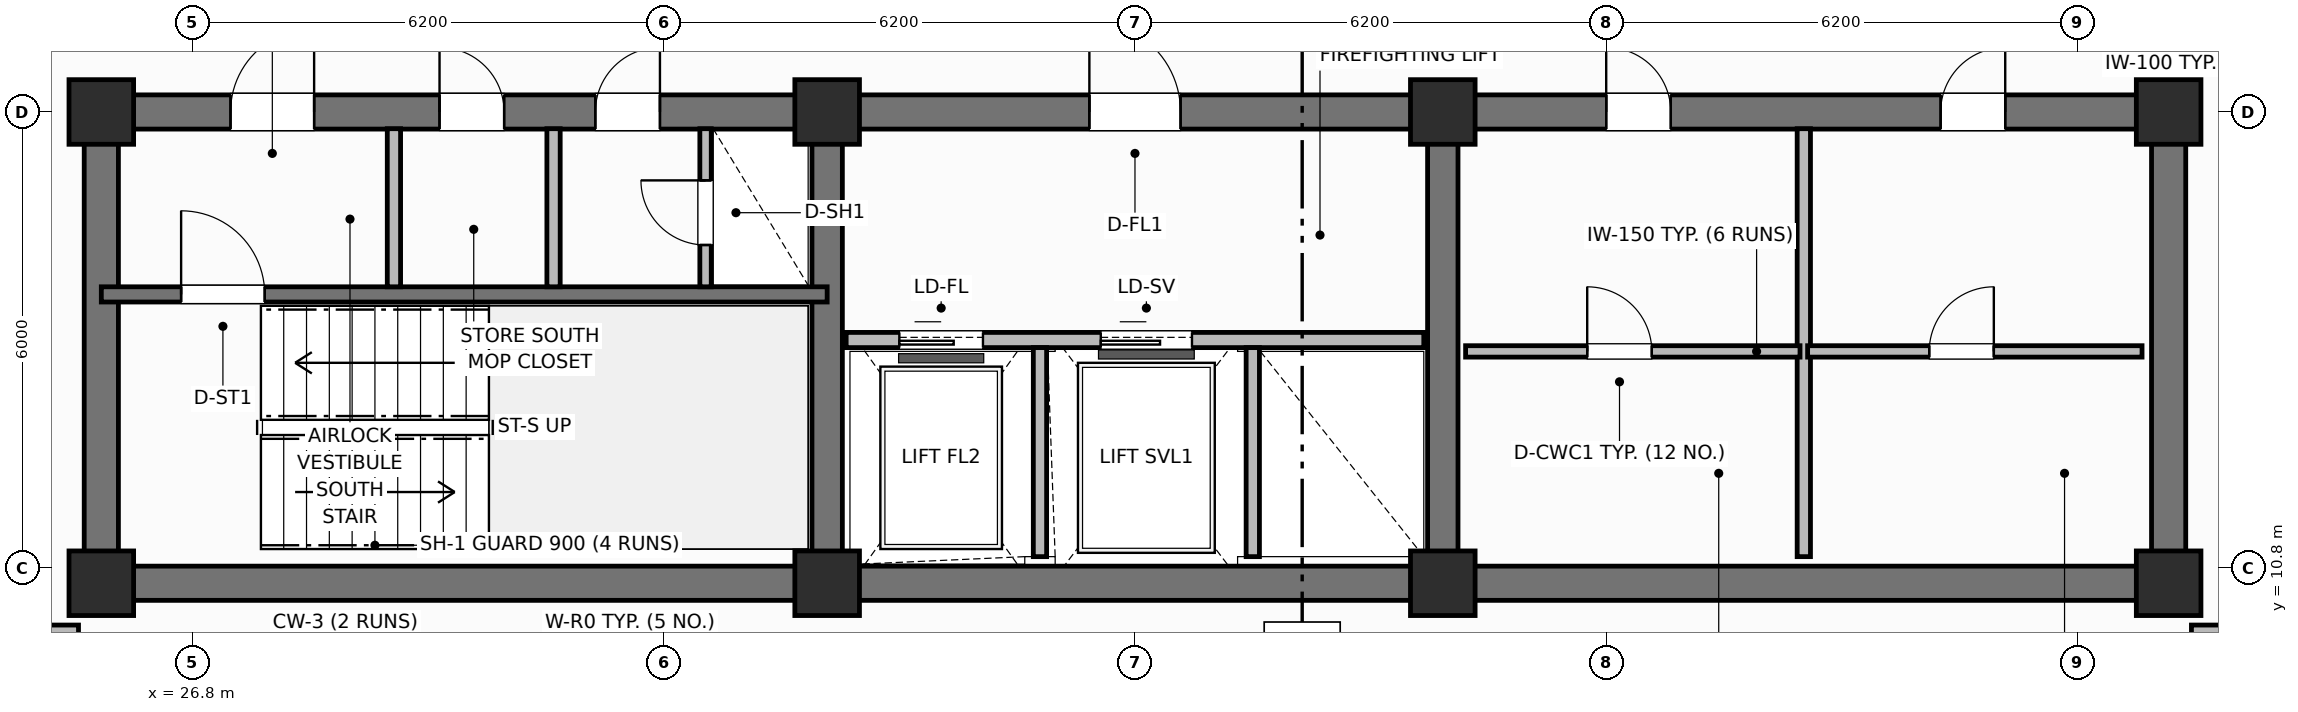
"""IFC4 building model, lengths in metres.
Left out: names, types, materials, properties, quantities, classifications, styles, units other than length and angle.
Written with IfcOpenShell. Run it as: python <this file> out.ifc"""

import sys

from ifc_helpers import new_model, si_unit, direction, frame, frame_2d, origin, origin_2d, place, context, subcontext, project, spatial, rectangle, extrude, element, fill, save


model = new_model("IFC4")
c1 = context("Model", 3, precision=1e-05, world=origin(), true_north=direction((0.0, 1.0)))
c2 = subcontext(c1, "Body", "Model", "MODEL_VIEW")
j1 = project(units=[si_unit("LENGTHUNIT", "METRE"), si_unit("PLANEANGLEUNIT", "RADIAN")], contexts=[c1])
p1 = place(None, origin())
s1 = spatial("IfcSite", under=j1, at=p1, CompositionType="ELEMENT")
p2 = place(p1, origin())
s2 = spatial("IfcBuilding", under=s1, at=p2, CompositionType="ELEMENT")
p3 = place(p2, frame((0.0, 0.0, 236.9)))
s3 = spatial("IfcBuildingStorey", under=s2, at=p3, CompositionType="ELEMENT", Elevation=236.9)
p4 = place(p3, frame((52.8, 10.6, 0.0), z_axis=(0.0, 0.0, 1.0), x_axis=(-1.0, 0.0, 0.0)))
e1 = element("IfcWall", 1, at=p4, inside=s3, PredefinedType="SHEAR", context=c2, shape_type="SweptSolid", body=[
    extrude(rectangle(XDim=27.2, YDim=0.45, at=frame_2d((13.6, 0.0))), origin(), (0.0, 0.0, 1.0), 3.7),
])
for number, where, z_axis, x_axis in (
    (2, (25.6, 10.825, 0.0), (0.0, 0.0, 1.0), (0.0, 1.0, 0.0)),
    (3, (52.8, 10.825, 0.0), (0.0, 0.0, 1.0), (0.0, 1.0, 0.0)),
):
    element("IfcWall", number, at=place(p3, frame(where, z_axis=z_axis, x_axis=x_axis)), inside=s3, PredefinedType="SHEAR", context=c2, shape_type="SweptSolid", body=[
        extrude(rectangle(XDim=5.75, YDim=0.45, at=frame_2d((2.875, 0.0))), origin(), (0.0, 0.0, 1.0), 3.7),
    ])
p5 = place(p3, frame((25.6, 16.8, 0.0), z_axis=(0.0, 0.0, 1.0), x_axis=(1.0, 0.0, 0.0)))
e4 = element("IfcWall", 4, at=p5, inside=s3, PredefinedType="SHEAR", context=c2, shape_type="SweptSolid", body=[
    extrude(rectangle(XDim=27.2, YDim=0.45, at=frame_2d((13.6, 0.0))), origin(), (0.0, 0.0, 1.0), 3.7),
])
p6 = place(p5, frame((1.7, 0.0, 0.0)))
e5 = element("IfcOpeningElement", 5, at=p6, cuts=e4, PredefinedType="OPENING", context=c2, shape_type="SweptSolid", body=[
    extrude(rectangle(XDim=1.1, YDim=2.15, at=frame_2d((0.55, 1.075))), frame((0.0, 0.235, 0.0), z_axis=(0.0, -1.0, 0.0), x_axis=(1.0, 0.0, 0.0)), (0.0, 0.0, 1.0), 0.47),
])
p7 = place(p5, frame((4.45, 0.0, 0.0)))
e6 = element("IfcOpeningElement", 6, at=p7, cuts=e4, PredefinedType="OPENING", context=c2, shape_type="SweptSolid", body=[
    extrude(rectangle(XDim=0.85, YDim=2.1, at=frame_2d((0.425, 1.05))), frame((0.0, 0.235, 0.0), z_axis=(0.0, -1.0, 0.0), x_axis=(1.0, 0.0, 0.0)), (0.0, 0.0, 1.0), 0.47),
])
p8 = place(p5, frame((6.5, 0.0, 0.0)))
e7 = element("IfcOpeningElement", 7, at=p8, cuts=e4, PredefinedType="OPENING", context=c2, shape_type="SweptSolid", body=[
    extrude(rectangle(XDim=0.85, YDim=2.1, at=frame_2d((0.425, 1.05))), frame((0.0, 0.235, 0.0), z_axis=(0.0, -1.0, 0.0), x_axis=(1.0, 0.0, 0.0)), (0.0, 0.0, 1.0), 0.47),
])
p9 = place(p5, frame((13.0, 0.0, 0.0)))
e8 = element("IfcOpeningElement", 8, at=p9, cuts=e4, PredefinedType="OPENING", context=c2, shape_type="SweptSolid", body=[
    extrude(rectangle(XDim=1.2, YDim=2.15, at=frame_2d((0.6, 1.075))), frame((0.0, 0.235, 0.0), z_axis=(0.0, -1.0, 0.0), x_axis=(1.0, 0.0, 0.0)), (0.0, 0.0, 1.0), 0.47),
])
p10 = place(p5, frame((19.8, 0.0, 0.0)))
e9 = element("IfcOpeningElement", 9, at=p10, cuts=e4, PredefinedType="OPENING", context=c2, shape_type="SweptSolid", body=[
    extrude(rectangle(XDim=0.85, YDim=2.1, at=frame_2d((0.425, 1.05))), frame((0.0, 0.235, 0.0), z_axis=(0.0, -1.0, 0.0), x_axis=(1.0, 0.0, 0.0)), (0.0, 0.0, 1.0), 0.47),
])
p11 = place(p5, frame((24.2, 0.0, 0.0)))
e10 = element("IfcOpeningElement", 10, at=p11, cuts=e4, PredefinedType="OPENING", context=c2, shape_type="SweptSolid", body=[
    extrude(rectangle(XDim=0.85, YDim=2.1, at=frame_2d((0.425, 1.05))), frame((0.0, 0.235, 0.0), z_axis=(0.0, -1.0, 0.0), x_axis=(1.0, 0.0, 0.0)), (0.0, 0.0, 1.0), 0.47),
])
for number, where, z_axis, x_axis in (
    (11, (35.15, 10.825, 0.0), (0.0, 0.0, 1.0), (0.0, 1.0, 0.0)),
    (12, (43.25, 10.825, 0.0), (0.0, 0.0, 1.0), (0.0, 1.0, 0.0)),
):
    element("IfcWall", number, at=place(p3, frame(where, z_axis=z_axis, x_axis=x_axis)), inside=s3, PredefinedType="SHEAR", context=c2, shape_type="SweptSolid", body=[
        extrude(rectangle(XDim=5.75, YDim=0.4, at=frame_2d((2.875, 0.0))), origin(), (0.0, 0.0, 1.0), 3.7),
    ])
for number, where, z_axis, x_axis in (
    (13, (25.6, 10.6, 0.0), (0.0, 0.0, 1.0), (1.0, 0.0, 0.0)),
    (14, (25.6, 16.8, 0.0), (0.0, 0.0, 1.0), (1.0, 0.0, 0.0)),
    (15, (35.15, 10.6, 0.0), (0.0, 0.0, 1.0), (1.0, 0.0, 0.0)),
    (16, (35.15, 16.8, 0.0), (0.0, 0.0, 1.0), (1.0, 0.0, 0.0)),
    (17, (43.25, 10.6, 0.0), (0.0, 0.0, 1.0), (1.0, 0.0, 0.0)),
    (18, (43.25, 16.8, 0.0), (0.0, 0.0, 1.0), (1.0, 0.0, 0.0)),
    (19, (52.8, 10.6, 0.0), (0.0, 0.0, 1.0), (1.0, 0.0, 0.0)),
    (20, (52.8, 16.8, 0.0), (0.0, 0.0, 1.0), (1.0, 0.0, 0.0)),
):
    element("IfcColumn", number, at=place(p3, frame(where, z_axis=z_axis, x_axis=x_axis)), inside=s3, PredefinedType="COLUMN", context=c2, shape_type="SweptSolid", body=[
        extrude(rectangle(XDim=0.85, YDim=0.85, at=origin_2d()), origin(), (0.0, 0.0, 1.0), 3.7),
    ])
p12 = place(p3, frame((25.6, 14.4, 0.0), z_axis=(0.0, 0.0, 1.0), x_axis=(1.0, 0.0, 0.0)))
e21 = element("IfcWall", 21, at=p12, inside=s3, PredefinedType="SHEAR", context=c2, shape_type="SweptSolid", body=[
    extrude(rectangle(XDim=9.55, YDim=0.2, at=frame_2d((4.775, 0.0))), origin(), (0.0, 0.0, 1.0), 3.7),
])
p13 = place(p12, frame((1.05, 0.0, 0.0)))
e22 = element("IfcOpeningElement", 22, at=p13, cuts=e21, PredefinedType="OPENING", context=c2, shape_type="SweptSolid", body=[
    extrude(rectangle(XDim=1.1, YDim=2.15, at=frame_2d((0.55, 1.075))), frame((0.0, 0.11, 0.0), z_axis=(0.0, -1.0, 0.0), x_axis=(1.0, 0.0, 0.0)), (0.0, 0.0, 1.0), 0.22),
])
for number, where, z_axis, x_axis in (
    (23, (29.45, 14.5, 0.0), (0.0, 0.0, 1.0), (0.0, 1.0, 0.0)),
    (24, (31.55, 14.5, 0.0), (0.0, 0.0, 1.0), (0.0, 1.0, 0.0)),
):
    element("IfcWall", number, at=place(p3, frame(where, z_axis=z_axis, x_axis=x_axis)), inside=s3, PredefinedType="PARTITIONING", context=c2, shape_type="SweptSolid", body=[
        extrude(rectangle(XDim=2.08, YDim=0.175, at=frame_2d((1.04, 0.0))), origin(), (0.0, 0.0, 1.0), 2.56),
    ])
p14 = place(p3, frame((33.55, 14.5, 0.0), z_axis=(0.0, 0.0, 1.0), x_axis=(0.0, 1.0, 0.0)))
e25 = element("IfcWall", 25, at=p14, inside=s3, PredefinedType="PARTITIONING", context=c2, shape_type="SweptSolid", body=[
    extrude(rectangle(XDim=2.08, YDim=0.15, at=frame_2d((1.04, 0.0))), origin(), (0.0, 0.0, 1.0), 2.56),
])
p15 = place(p14, frame((0.55, 0.0, 0.0)))
e26 = element("IfcOpeningElement", 26, at=p15, cuts=e25, PredefinedType="OPENING", context=c2, shape_type="SweptSolid", body=[
    extrude(rectangle(XDim=0.85, YDim=2.05, at=frame_2d((0.425, 1.025))), frame((0.0, 0.085, 0.0), z_axis=(0.0, -1.0, 0.0), x_axis=(1.0, 0.0, 0.0)), (0.0, 0.0, 1.0), 0.17),
])
p16 = place(p3, frame((35.4, 13.8, 0.0), z_axis=(0.0, 0.0, 1.0), x_axis=(1.0, 0.0, 0.0)))
e27 = element("IfcWall", 27, at=p16, inside=s3, PredefinedType="PARTITIONING", context=c2, shape_type="SweptSolid", body=[
    extrude(rectangle(XDim=7.6, YDim=0.2, at=frame_2d((3.8, 0.0))), origin(), (0.0, 0.0, 1.0), 2.33),
])
p17 = place(p16, frame((0.7, 0.0, 0.0)))
e28 = element("IfcOpeningElement", 28, at=p17, cuts=e27, PredefinedType="OPENING", context=c2, shape_type="SweptSolid", body=[
    extrude(rectangle(XDim=1.1, YDim=2.15, at=frame_2d((0.55, 1.075))), frame((0.0, 0.11, 0.0), z_axis=(0.0, -1.0, 0.0), x_axis=(1.0, 0.0, 0.0)), (0.0, 0.0, 1.0), 0.22),
])
p18 = place(p16, frame((3.35, 0.0, 0.0)))
e29 = element("IfcOpeningElement", 29, at=p18, cuts=e27, PredefinedType="OPENING", context=c2, shape_type="SweptSolid", body=[
    extrude(rectangle(XDim=1.2, YDim=2.15, at=frame_2d((0.6, 1.075))), frame((0.0, 0.11, 0.0), z_axis=(0.0, -1.0, 0.0), x_axis=(1.0, 0.0, 0.0)), (0.0, 0.0, 1.0), 0.22),
])
for number, where, z_axis, x_axis in (
    (30, (37.95, 10.95, 0.0), (0.0, 0.0, 1.0), (0.0, 1.0, 0.0)),
    (31, (40.75, 10.95, 0.0), (0.0, 0.0, 1.0), (0.0, 1.0, 0.0)),
):
    element("IfcWall", number, at=place(p3, frame(where, z_axis=z_axis, x_axis=x_axis)), inside=s3, PredefinedType="PARTITIONING", context=c2, shape_type="SweptSolid", body=[
        extrude(rectangle(XDim=2.75, YDim=0.175, at=frame_2d((1.375, 0.0))), origin(), (0.0, 0.0, 1.0), 2.56),
    ])
p19 = place(p3, frame((48.0, 10.95, 0.0), z_axis=(0.0, 0.0, 1.0), x_axis=(0.0, 1.0, 0.0)))
e32 = element("IfcWall", 32, at=p19, inside=s3, PredefinedType="PARTITIONING", context=c2, shape_type="SweptSolid", body=[
    extrude(rectangle(XDim=5.63, YDim=0.175, at=frame_2d((2.815, 0.0))), origin(), (0.0, 0.0, 1.0), 2.56),
])
p20 = place(p3, frame((43.55, 13.65, 0.0), z_axis=(0.0, 0.0, 1.0), x_axis=(1.0, 0.0, 0.0)))
e33 = element("IfcWall", 33, at=p20, inside=s3, PredefinedType="PARTITIONING", context=c2, shape_type="SweptSolid", body=[
    extrude(rectangle(XDim=4.4, YDim=0.15, at=frame_2d((2.2, 0.0))), origin(), (0.0, 0.0, 1.0), 2.56),
])
p21 = place(p20, frame((1.6, 0.0, 0.0)))
e34 = element("IfcOpeningElement", 34, at=p21, cuts=e33, PredefinedType="OPENING", context=c2, shape_type="SweptSolid", body=[
    extrude(rectangle(XDim=0.85, YDim=2.1, at=frame_2d((0.425, 1.05))), frame((0.0, 0.085, 0.0), z_axis=(0.0, -1.0, 0.0), x_axis=(1.0, 0.0, 0.0)), (0.0, 0.0, 1.0), 0.17),
])
p22 = place(p3, frame((48.05, 13.65, 0.0), z_axis=(0.0, 0.0, 1.0), x_axis=(1.0, 0.0, 0.0)))
e35 = element("IfcWall", 35, at=p22, inside=s3, PredefinedType="PARTITIONING", context=c2, shape_type="SweptSolid", body=[
    extrude(rectangle(XDim=4.4, YDim=0.15, at=frame_2d((2.2, 0.0))), origin(), (0.0, 0.0, 1.0), 2.56),
])
p23 = place(p22, frame((1.6, 0.0, 0.0)))
e36 = element("IfcOpeningElement", 36, at=p23, cuts=e35, PredefinedType="OPENING", context=c2, shape_type="SweptSolid", body=[
    extrude(rectangle(XDim=0.85, YDim=2.1, at=frame_2d((0.425, 1.05))), frame((0.0, 0.085, 0.0), z_axis=(0.0, -1.0, 0.0), x_axis=(1.0, 0.0, 0.0)), (0.0, 0.0, 1.0), 0.17),
])
p24 = place(p3, frame((21.546, 9.95, 0.0), z_axis=(0.0, 0.0, 1.0), x_axis=(1.0, 0.0, 0.0)))
e37 = element("IfcWall", 37, at=p24, inside=s3, PredefinedType="PARTITIONING", context=c2, shape_type="SweptSolid", body=[
    extrude(rectangle(XDim=3.754, YDim=0.2, at=frame_2d((1.877, 0.0))), origin(), (0.0, 0.0, 1.0), 2.56),
])
p25 = place(p3, frame((53.1, 9.95, 0.0), z_axis=(0.0, 0.0, 1.0), x_axis=(1.0, 0.0, 0.0)))
e38 = element("IfcWall", 38, at=p25, inside=s3, PredefinedType="PARTITIONING", context=c2, shape_type="SweptSolid", body=[
    extrude(rectangle(XDim=3.754, YDim=0.2, at=frame_2d((1.877, 0.0))), origin(), (0.0, 0.0, 1.0), 2.56),
])
p26 = place(p13, origin())
e39 = element("IfcDoor", 39, at=p26, inside=s3, OperationType="SINGLE_SWING_LEFT", PredefinedType="DOOR", context=c2, shape_type="SweptSolid", body=[
    extrude(rectangle(XDim=1.1, YDim=2.15, at=frame_2d((0.55, 1.075))), frame((0.0, 0.025, 0.0), z_axis=(0.0, -1.0, 0.0), x_axis=(1.0, 0.0, 0.0)), (0.0, 0.0, 1.0), 0.05),
])
fill(e22, e39)
p27 = place(p15, origin())
e40 = element("IfcDoor", 40, at=p27, inside=s3, OperationType="SINGLE_SWING_RIGHT", PredefinedType="TRAPDOOR", context=c2, shape_type="SweptSolid", body=[
    extrude(rectangle(XDim=0.85, YDim=2.05, at=frame_2d((0.425, 1.025))), frame((0.0, 0.025, 0.0), z_axis=(0.0, -1.0, 0.0), x_axis=(1.0, 0.0, 0.0)), (0.0, 0.0, 1.0), 0.05),
])
fill(e26, e40)
p28 = place(p17, origin())
e41 = element("IfcDoor", 41, at=p28, inside=s3, OperationType="SLIDING_TO_LEFT", PredefinedType="DOOR", context=c2, shape_type="SweptSolid", body=[
    extrude(rectangle(XDim=1.1, YDim=2.15, at=frame_2d((0.55, 1.075))), frame((0.0, 0.025, 0.0), z_axis=(0.0, -1.0, 0.0), x_axis=(1.0, 0.0, 0.0)), (0.0, 0.0, 1.0), 0.05),
])
fill(e28, e41)
p29 = place(p18, origin())
e42 = element("IfcDoor", 42, at=p29, inside=s3, OperationType="SLIDING_TO_LEFT", PredefinedType="DOOR", context=c2, shape_type="SweptSolid", body=[
    extrude(rectangle(XDim=1.2, YDim=2.15, at=frame_2d((0.6, 1.075))), frame((0.0, 0.025, 0.0), z_axis=(0.0, -1.0, 0.0), x_axis=(1.0, 0.0, 0.0)), (0.0, 0.0, 1.0), 0.05),
])
fill(e29, e42)
p30 = place(p21, origin())
e43 = element("IfcDoor", 43, at=p30, inside=s3, OperationType="SINGLE_SWING_LEFT", PredefinedType="DOOR", context=c2, shape_type="SweptSolid", body=[
    extrude(rectangle(XDim=0.85, YDim=2.1, at=frame_2d((0.425, 1.05))), frame((0.0, 0.025, 0.0), z_axis=(0.0, -1.0, 0.0), x_axis=(1.0, 0.0, 0.0)), (0.0, 0.0, 1.0), 0.05),
])
fill(e34, e43)
p31 = place(p23, origin())
e44 = element("IfcDoor", 44, at=p31, inside=s3, OperationType="SINGLE_SWING_RIGHT", PredefinedType="DOOR", context=c2, shape_type="SweptSolid", body=[
    extrude(rectangle(XDim=0.85, YDim=2.1, at=frame_2d((0.425, 1.05))), frame((0.0, 0.025, 0.0), z_axis=(0.0, -1.0, 0.0), x_axis=(1.0, 0.0, 0.0)), (0.0, 0.0, 1.0), 0.05),
])
fill(e36, e44)
p32 = place(p6, origin())
e45 = element("IfcDoor", 45, at=p32, inside=s3, OperationType="SINGLE_SWING_RIGHT", PredefinedType="DOOR", context=c2, shape_type="SweptSolid", body=[
    extrude(rectangle(XDim=1.1, YDim=2.15, at=frame_2d((0.55, 1.075))), frame((0.0, 0.025, 0.0), z_axis=(0.0, -1.0, 0.0), x_axis=(1.0, 0.0, 0.0)), (0.0, 0.0, 1.0), 0.05),
])
fill(e5, e45)
p33 = place(p7, origin())
e46 = element("IfcDoor", 46, at=p33, inside=s3, OperationType="SINGLE_SWING_LEFT", PredefinedType="DOOR", context=c2, shape_type="SweptSolid", body=[
    extrude(rectangle(XDim=0.85, YDim=2.1, at=frame_2d((0.425, 1.05))), frame((0.0, 0.025, 0.0), z_axis=(0.0, -1.0, 0.0), x_axis=(1.0, 0.0, 0.0)), (0.0, 0.0, 1.0), 0.05),
])
fill(e6, e46)
p34 = place(p8, origin())
e47 = element("IfcDoor", 47, at=p34, inside=s3, OperationType="SINGLE_SWING_RIGHT", PredefinedType="DOOR", context=c2, shape_type="SweptSolid", body=[
    extrude(rectangle(XDim=0.85, YDim=2.1, at=frame_2d((0.425, 1.05))), frame((0.0, 0.025, 0.0), z_axis=(0.0, -1.0, 0.0), x_axis=(1.0, 0.0, 0.0)), (0.0, 0.0, 1.0), 0.05),
])
fill(e7, e47)
p35 = place(p9, origin())
e48 = element("IfcDoor", 48, at=p35, inside=s3, OperationType="SINGLE_SWING_LEFT", PredefinedType="DOOR", context=c2, shape_type="SweptSolid", body=[
    extrude(rectangle(XDim=1.2, YDim=2.15, at=frame_2d((0.6, 1.075))), frame((0.0, 0.025, 0.0), z_axis=(0.0, -1.0, 0.0), x_axis=(1.0, 0.0, 0.0)), (0.0, 0.0, 1.0), 0.05),
])
fill(e8, e48)
p36 = place(p10, origin())
e49 = element("IfcDoor", 49, at=p36, inside=s3, OperationType="SINGLE_SWING_LEFT", PredefinedType="DOOR", context=c2, shape_type="SweptSolid", body=[
    extrude(rectangle(XDim=0.85, YDim=2.1, at=frame_2d((0.425, 1.05))), frame((0.0, 0.025, 0.0), z_axis=(0.0, -1.0, 0.0), x_axis=(1.0, 0.0, 0.0)), (0.0, 0.0, 1.0), 0.05),
])
fill(e9, e49)
p37 = place(p11, origin())
e50 = element("IfcDoor", 50, at=p37, inside=s3, OperationType="SINGLE_SWING_RIGHT", PredefinedType="DOOR", context=c2, shape_type="SweptSolid", body=[
    extrude(rectangle(XDim=0.85, YDim=2.1, at=frame_2d((0.425, 1.05))), frame((0.0, 0.025, 0.0), z_axis=(0.0, -1.0, 0.0), x_axis=(1.0, 0.0, 0.0)), (0.0, 0.0, 1.0), 0.05),
])
fill(e10, e50)
save(model, sys.argv[1])
